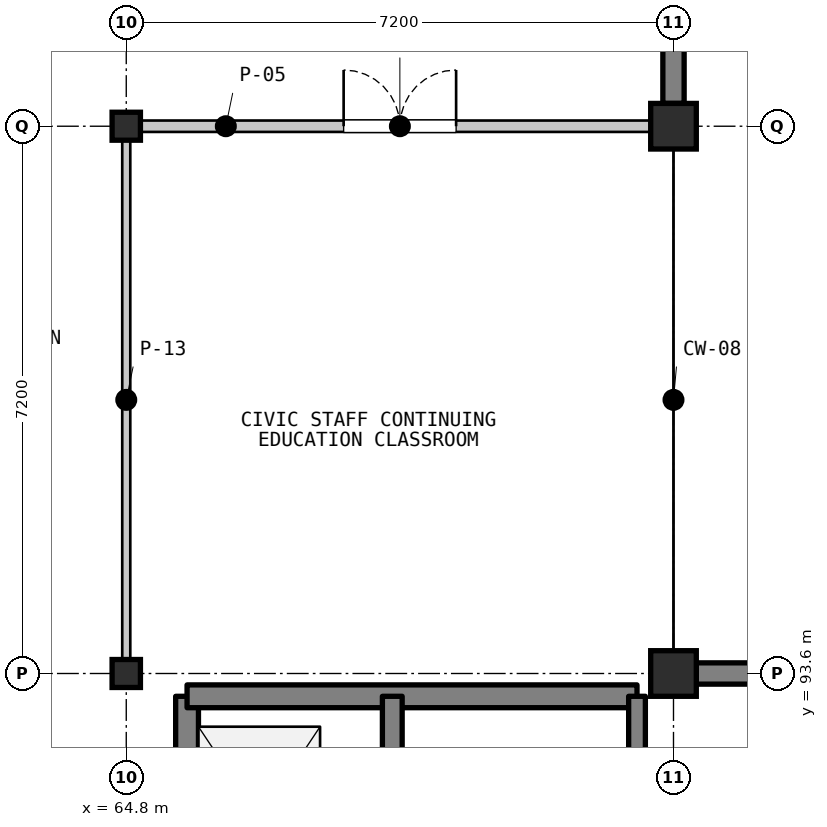
"""IFC4 building model, lengths in metres.
Left out: names, types, materials, properties, quantities, classifications, styles, units other than length and angle.
Written with IfcOpenShell. Run it as: python <this file> out.ifc"""

import sys

from ifc_helpers import new_model, si_unit, direction, frame, frame_2d, origin, origin_2d, place, context, subcontext, project, spatial, rectangle, i_section, extrude, element, fill, save


model = new_model("IFC4")
c1 = context("Model", 3, precision=1e-05, world=origin(), true_north=direction((0.0, 1.0)))
c2 = subcontext(c1, "Body", "Model", "MODEL_VIEW")
j1 = project(units=[si_unit("LENGTHUNIT", "METRE"), si_unit("PLANEANGLEUNIT", "RADIAN")], contexts=[c1])
p1 = place(None, origin())
s1 = spatial("IfcSite", under=j1, at=p1, CompositionType="ELEMENT")
p2 = place(p1, origin())
s2 = spatial("IfcBuilding", under=s1, at=p2, CompositionType="ELEMENT")
p3 = place(p2, frame((0.0, 0.0, 18.0)))
s3 = spatial("IfcBuildingStorey", under=s2, at=p3, CompositionType="ELEMENT", Elevation=18.0)
for number, where, z_axis, x_axis in (
    (1, (64.8, 93.6, 0.0), (0.0, 0.0, 1.0), (1.0, 0.0, 0.0)),
    (2, (64.8, 100.8, 0.0), (0.0, 0.0, 1.0), (1.0, 0.0, 0.0)),
):
    element("IfcColumn", number, at=place(p3, frame(where, z_axis=z_axis, x_axis=x_axis)), inside=s3, PredefinedType="COLUMN", context=c2, shape_type="SweptSolid", body=[
        extrude(i_section(OverallWidth=0.373, OverallDepth=0.368, WebThickness=0.015, FlangeThickness=0.024, FilletRadius=0.015, at=origin_2d()), origin(), (0.0, 0.0, 1.0), 3.9),
    ])
for number, where, z_axis, x_axis in (
    (3, (72.0, 93.6, 0.0), (0.0, 0.0, 1.0), (1.0, 0.0, 0.0)),
    (4, (72.0, 100.8, 0.0), (0.0, 0.0, 1.0), (1.0, 0.0, 0.0)),
):
    element("IfcColumn", number, at=place(p3, frame(where, z_axis=z_axis, x_axis=x_axis)), inside=s3, PredefinedType="COLUMN", context=c2, shape_type="SweptSolid", body=[
        extrude(rectangle(XDim=0.6, YDim=0.6, at=origin_2d()), origin(), (0.0, 0.0, 1.0), 3.9),
    ])
for number, where, z_axis, x_axis in (
    (5, (72.0, 107.7, 0.0), (0.0, 0.0, 1.0), (0.0, -1.0, 0.0)),
    (6, (72.3, 93.6, 0.0), (0.0, 0.0, 1.0), (1.0, 0.0, 0.0)),
):
    element("IfcWall", number, at=place(p3, frame(where, z_axis=z_axis, x_axis=x_axis)), inside=s3, PredefinedType="SOLIDWALL", context=c2, shape_type="SweptSolid", body=[
        extrude(rectangle(XDim=6.6, YDim=0.28, at=frame_2d((3.3, 0.0))), origin(), (0.0, 0.0, 1.0), 3.192),
    ])
p4 = place(p3, frame((65.6, 88.98, 0.0), z_axis=(0.0, 0.0, 1.0), x_axis=(0.0, 1.0, 0.0)))
e7 = element("IfcWall", 7, at=p4, inside=s3, PredefinedType="SHEAR", context=c2, shape_type="SweptSolid", body=[
    extrude(rectangle(XDim=4.32, YDim=0.3, at=frame_2d((2.16, 0.0))), origin(), (0.0, 0.0, 1.0), 3.72),
])
p5 = place(p3, frame((65.6, 93.3, 0.0), z_axis=(0.0, 0.0, 1.0), x_axis=(1.0, 0.0, 0.0)))
e8 = element("IfcWall", 8, at=p5, inside=s3, PredefinedType="SHEAR", context=c2, shape_type="SweptSolid", body=[
    extrude(rectangle(XDim=5.92, YDim=0.3, at=frame_2d((2.96, 0.0))), origin(), (0.0, 0.0, 1.0), 3.72),
])
p6 = place(p3, frame((68.3, 93.3, 0.0), z_axis=(0.0, 0.0, 1.0), x_axis=(0.0, -1.0, 0.0)))
e9 = element("IfcWall", 9, at=p6, inside=s3, PredefinedType="SHEAR", context=c2, shape_type="SweptSolid", body=[
    extrude(rectangle(XDim=4.32, YDim=0.26, at=frame_2d((2.16, 0.0))), origin(), (0.0, 0.0, 1.0), 3.72),
])
p7 = place(p6, frame((1.0, 0.0, 0.0)))
e10 = element("IfcOpeningElement", 10, at=p7, cuts=e9, PredefinedType="OPENING", context=c2, shape_type="SweptSolid", body=[
    extrude(rectangle(XDim=1.2, YDim=2.15, at=frame_2d((0.6, 1.075))), frame((0.0, 0.14, 0.0), z_axis=(0.0, -1.0, 0.0), x_axis=(1.0, 0.0, 0.0)), (0.0, 0.0, 1.0), 0.28),
])
p8 = place(p6, frame((3.325, 0.0, 0.0)))
e11 = element("IfcOpeningElement", 11, at=p8, cuts=e9, PredefinedType="OPENING", context=c2, shape_type="SweptSolid", body=[
    extrude(rectangle(XDim=0.85, YDim=2.05, at=frame_2d((0.425, 1.025))), frame((0.0, 0.14, 0.0), z_axis=(0.0, -1.0, 0.0), x_axis=(1.0, 0.0, 0.0)), (0.0, 0.0, 1.0), 0.28),
])
p9 = place(p3, frame((71.52, 93.3, 0.0), z_axis=(0.0, 0.0, 1.0), x_axis=(0.0, -1.0, 0.0)))
e12 = element("IfcWall", 12, at=p9, inside=s3, PredefinedType="SHEAR", context=c2, shape_type="SweptSolid", body=[
    extrude(rectangle(XDim=4.45, YDim=0.22, at=frame_2d((2.225, 0.0))), origin(), (0.0, 0.0, 1.0), 3.72),
])
p10 = place(p9, frame((1.55, 0.0, 0.0)))
e13 = element("IfcOpeningElement", 13, at=p10, cuts=e12, PredefinedType="OPENING", context=c2, shape_type="SweptSolid", body=[
    extrude(rectangle(XDim=1.6, YDim=2.2, at=frame_2d((0.8, 1.1))), frame((0.0, 0.12, 0.0), z_axis=(0.0, -1.0, 0.0), x_axis=(1.0, 0.0, 0.0)), (0.0, 0.0, 1.0), 0.24),
])
p11 = place(p3, frame((64.92, 100.8, 0.0), z_axis=(0.0, 0.0, 1.0), x_axis=(1.0, 0.0, 0.0)))
e14 = element("IfcWall", 14, at=p11, inside=s3, PredefinedType="PARTITIONING", context=c2, shape_type="SweptSolid", body=[
    extrude(rectangle(XDim=6.96, YDim=0.15, at=frame_2d((3.48, 0.0))), origin(), (0.0, 0.0, 1.0), 3.108),
])
p12 = place(p11, frame((2.74, 0.0, 0.0)))
e15 = element("IfcOpeningElement", 15, at=p12, cuts=e14, PredefinedType="OPENING", context=c2, shape_type="SweptSolid", body=[
    extrude(rectangle(XDim=1.48, YDim=2.25, at=frame_2d((0.74, 1.125))), frame((0.0, 0.085, 0.0), z_axis=(0.0, -1.0, 0.0), x_axis=(1.0, 0.0, 0.0)), (0.0, 0.0, 1.0), 0.17),
])
p13 = place(p3, frame((64.8, 93.72, 0.0), z_axis=(0.0, 0.0, 1.0), x_axis=(0.0, 1.0, 0.0)))
e16 = element("IfcWall", 16, at=p13, inside=s3, PredefinedType="PARTITIONING", context=c2, shape_type="SweptSolid", body=[
    extrude(rectangle(XDim=6.96, YDim=0.106, at=frame_2d((3.48, 0.0))), origin(), (0.0, 0.0, 1.0), 3.108),
])
p14 = place(p12, origin())
e17 = element("IfcDoor", 17, at=p14, inside=s3, OperationType="DOUBLE_DOOR_SINGLE_SWING", PredefinedType="DOOR", context=c2, shape_type="SweptSolid", body=[
    extrude(rectangle(XDim=1.48, YDim=2.25, at=frame_2d((0.74, 1.125))), frame((0.0, 0.025, 0.0), z_axis=(0.0, -1.0, 0.0), x_axis=(1.0, 0.0, 0.0)), (0.0, 0.0, 1.0), 0.05),
])
fill(e15, e17)
save(model, sys.argv[1])
